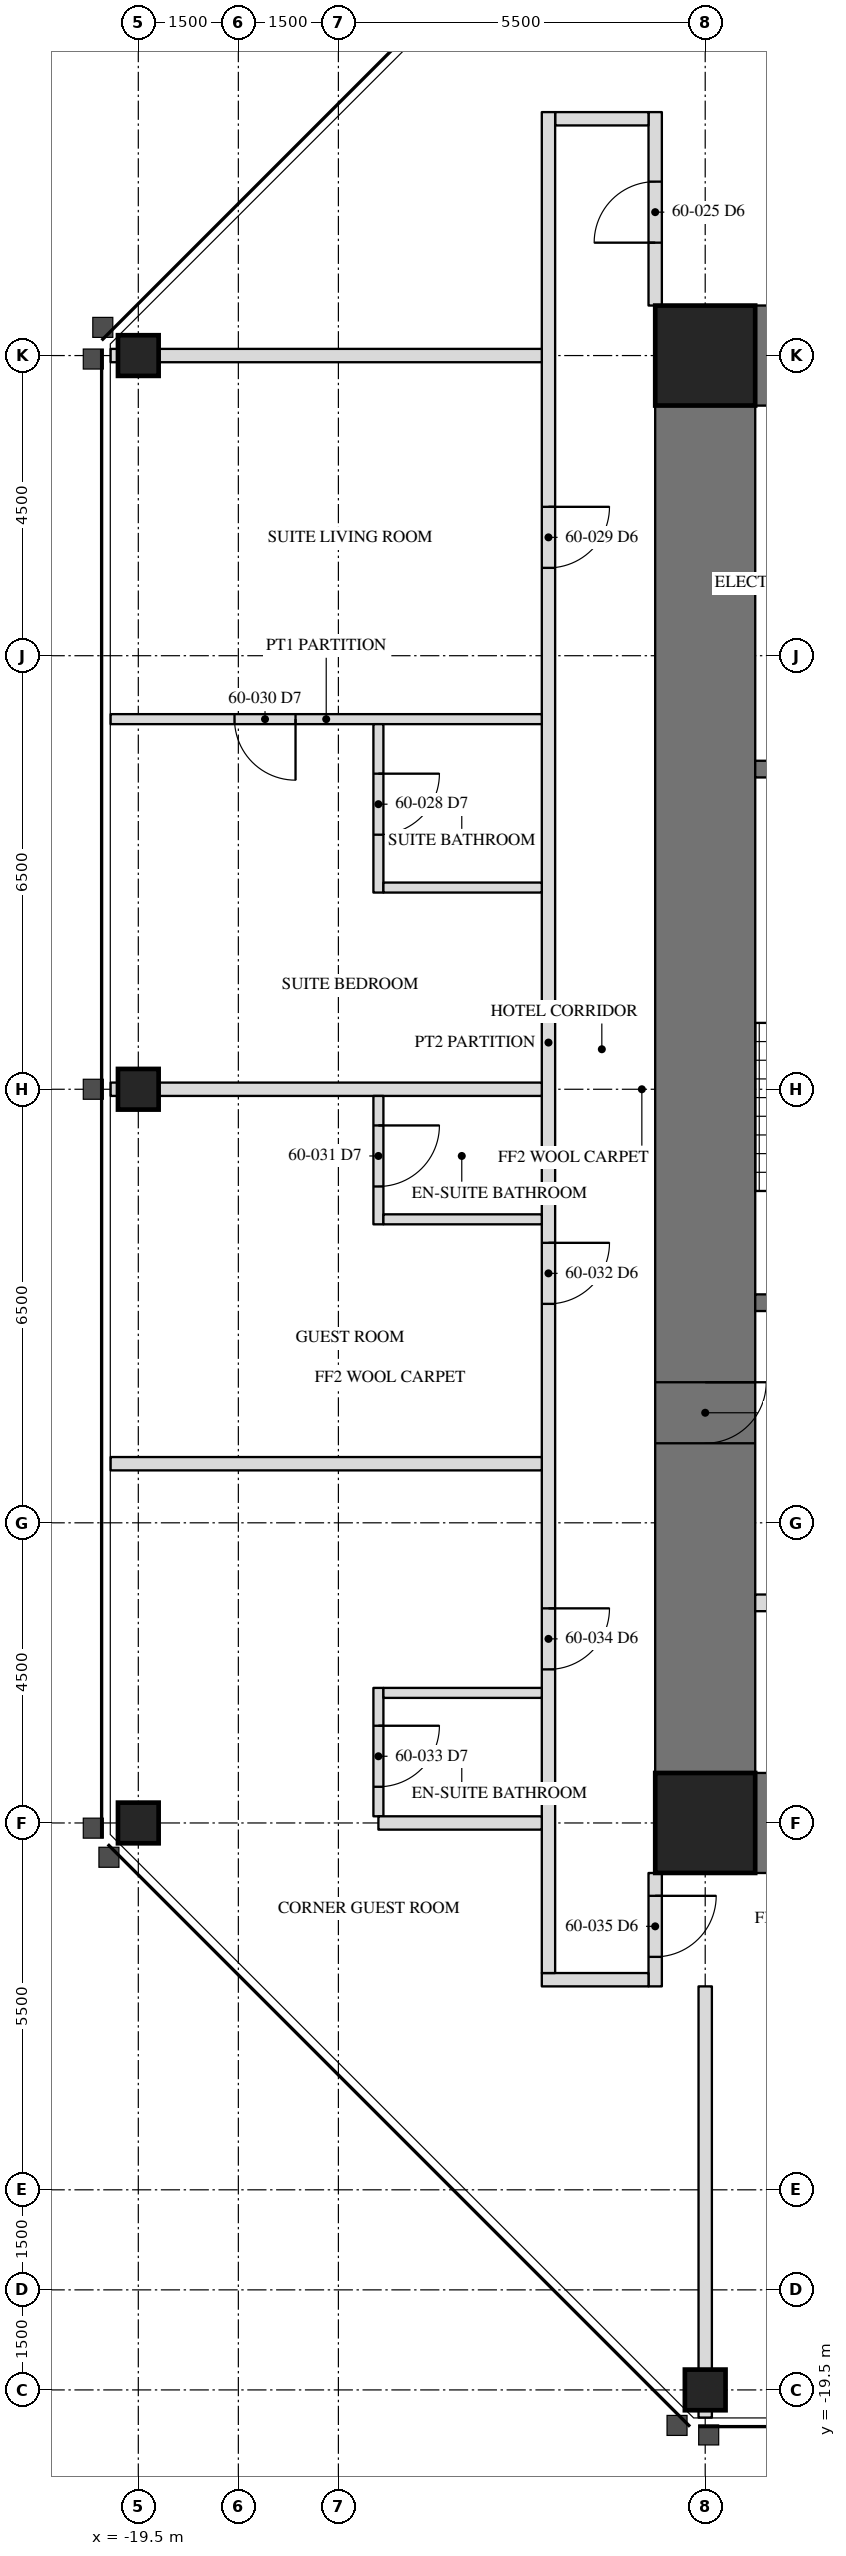
"""IFC4 building model, lengths in metres.
Left out: names, types, materials, properties, quantities, classifications, styles, units other than length and angle.
Written with IfcOpenShell. Run it as: python <this file> out.ifc"""

import sys

from ifc_helpers import new_model, si_unit, direction, frame, frame_2d, origin, origin_2d, place, context, subcontext, project, spatial, rectangle, hollow_rectangle, extrude, element, fill, save


model = new_model("IFC4")
c1 = context("Model", 3, precision=1e-05, world=origin(), true_north=direction((0.0, 1.0)))
c2 = subcontext(c1, "Body", "Model", "MODEL_VIEW")
j1 = project(units=[si_unit("LENGTHUNIT", "METRE"), si_unit("PLANEANGLEUNIT", "RADIAN")], contexts=[c1])
p1 = place(None, origin())
s1 = spatial("IfcSite", under=j1, at=p1, CompositionType="ELEMENT")
p2 = place(p1, origin())
s2 = spatial("IfcBuilding", under=s1, at=p2, CompositionType="ELEMENT")
p3 = place(p2, frame((0.0, 0.0, 246.7)))
s3 = spatial("IfcBuildingStorey", under=s2, at=p3, CompositionType="ELEMENT", Elevation=246.7)
for number, where, z_axis, x_axis in (
    (1, (-19.5, 0.0, 0.0), (0.0, 0.0, 1.0), (0.0, 1.0, 0.0)),
    (2, (-19.5, -11.0, 0.0), (0.0, 0.0, 1.0), (0.0, 1.0, 0.0)),
    (3, (-11.0, -19.5, 0.0), (0.0, 0.0, 1.0), (1.0, 0.0, 0.0)),
    (4, (-19.5, 11.0, 0.0), (0.0, 0.0, 1.0), (0.0, 1.0, 0.0)),
):
    element("IfcColumn", number, at=place(p3, frame(where, z_axis=z_axis, x_axis=x_axis)), inside=s3, PredefinedType="COLUMN", context=c2, shape_type="SweptSolid", body=[
        extrude(hollow_rectangle(XDim=0.61, YDim=0.61, WallThickness=0.051, at=origin_2d()), origin(), (0.0, 0.0, 1.0), 3.5),
    ])
p4 = place(p3, frame((-11.0, 11.0, 0.0), z_axis=(0.0, 0.0, 1.0), x_axis=(0.0, -1.0, 0.0)))
e5 = element("IfcWall", 5, at=p4, inside=s3, PredefinedType="SHEAR", context=c2, shape_type="SweptSolid", body=[
    extrude(rectangle(XDim=22.0, YDim=1.5, at=frame_2d((11.0, 0.0))), origin(), (0.0, 0.0, 1.0), 3.5),
])
p5 = place(p4, frame((15.393, 0.0, 0.0)))
e6 = element("IfcOpeningElement", 6, at=p5, cuts=e5, PredefinedType="OPENING", context=c2, shape_type="SweptSolid", body=[
    extrude(rectangle(XDim=0.915, YDim=2.134, at=frame_2d((0.458, 1.067))), frame((0.0, 0.76, 0.0), z_axis=(0.0, -1.0, 0.0), x_axis=(1.0, 0.0, 0.0)), (0.0, 0.0, 1.0), 1.52),
])
for number, where, z_axis, x_axis in (
    (7, (-6.5, 11.0, 0.0), (0.0, 0.0, 1.0), (-1.0, 0.0, 0.0)),
    (8, (-11.0, -11.0, 0.0), (0.0, 0.0, 1.0), (1.0, 0.0, 0.0)),
):
    element("IfcWall", number, at=place(p3, frame(where, z_axis=z_axis, x_axis=x_axis)), inside=s3, PredefinedType="SHEAR", context=c2, shape_type="SweptSolid", body=[
        extrude(rectangle(XDim=4.5, YDim=1.5, at=frame_2d((2.25, 0.0))), origin(), (0.0, 0.0, 1.0), 3.5),
    ])
for number, where, z_axis, x_axis in (
    (9, (-11.0, 11.0, 0.0), (0.0, 0.0, 1.0), (1.0, 0.0, 0.0)),
    (10, (-11.0, -11.0, 0.0), (0.0, 0.0, 1.0), (1.0, 0.0, 0.0)),
):
    element("IfcColumn", number, at=place(p3, frame(where, z_axis=z_axis, x_axis=x_axis)), inside=s3, PredefinedType="COLUMN", context=c2, shape_type="SweptSolid", body=[
        extrude(hollow_rectangle(XDim=1.499, YDim=1.499, WallThickness=0.102, at=origin_2d()), origin(), (0.0, 0.0, 1.0), 3.5),
    ])
p6 = place(p3, frame((-6.95, 4.8, 0.0), z_axis=(0.0, 0.0, 1.0), x_axis=(-1.0, 0.0, 0.0)))
e11 = element("IfcWall", 11, at=p6, inside=s3, PredefinedType="SOLIDWALL", context=c2, shape_type="SweptSolid", body=[
    extrude(rectangle(XDim=3.3, YDim=0.25, at=frame_2d((1.65, 0.0))), origin(), (0.0, 0.0, 1.0), 3.31),
])
p7 = place(p3, frame((-6.95, -3.2, 0.0), z_axis=(0.0, 0.0, 1.0), x_axis=(-1.0, 0.0, 0.0)))
e12 = element("IfcWall", 12, at=p7, inside=s3, PredefinedType="SOLIDWALL", context=c2, shape_type="SweptSolid", body=[
    extrude(rectangle(XDim=3.3, YDim=0.25, at=frame_2d((1.65, 0.0))), origin(), (0.0, 0.0, 1.0), 3.31),
])
p8 = place(p7, frame((1.116, 0.0, 0.0)))
e13 = element("IfcOpeningElement", 13, at=p8, cuts=e12, PredefinedType="OPENING", context=c2, shape_type="SweptSolid", body=[
    extrude(rectangle(XDim=1.067, YDim=2.134, at=frame_2d((0.533, 1.067))), frame((0.0, 0.135, 0.0), z_axis=(0.0, -1.0, 0.0), x_axis=(1.0, 0.0, 0.0)), (0.0, 0.0, 1.0), 0.27),
])
p9 = place(p3, frame((-6.95, -7.7, 0.0), z_axis=(0.0, 0.0, 1.0), x_axis=(-1.0, 0.0, 0.0)))
e14 = element("IfcWall", 14, at=p9, inside=s3, PredefinedType="PARTITIONING", context=c2, shape_type="SweptSolid", body=[
    extrude(rectangle(XDim=3.3, YDim=0.25, at=frame_2d((1.65, 0.0))), origin(), (0.0, 0.0, 1.0), 3.31),
])
p10 = place(p9, frame((0.45, 0.0, 0.0)))
e15 = element("IfcOpeningElement", 15, at=p10, cuts=e14, PredefinedType="OPENING", context=c2, shape_type="SweptSolid", body=[
    extrude(rectangle(XDim=1.219, YDim=2.134, at=frame_2d((0.609, 1.067))), frame((0.0, 0.135, 0.0), z_axis=(0.0, -1.0, 0.0), x_axis=(1.0, 0.0, 0.0)), (0.0, 0.0, 1.0), 0.27),
])
p11 = place(p3, frame((-11.75, 11.75, 0.0), z_axis=(0.0, 0.0, 1.0), x_axis=(0.0, 1.0, 0.0)))
e16 = element("IfcWall", 16, at=p11, inside=s3, PredefinedType="PARTITIONING", context=c2, shape_type="SweptSolid", body=[
    extrude(rectangle(XDim=2.9, YDim=0.2, at=frame_2d((1.45, 0.0))), origin(), (0.0, 0.0, 1.0), 3.31),
])
p12 = place(p11, frame((0.942, 0.0, 0.0)))
e17 = element("IfcOpeningElement", 17, at=p12, cuts=e16, PredefinedType="OPENING", context=c2, shape_type="SweptSolid", body=[
    extrude(rectangle(XDim=0.915, YDim=2.134, at=frame_2d((0.458, 1.067))), frame((0.0, 0.11, 0.0), z_axis=(0.0, -1.0, 0.0), x_axis=(1.0, 0.0, 0.0)), (0.0, 0.0, 1.0), 0.22),
])
p13 = place(p3, frame((-11.85, 14.55, 0.0), z_axis=(0.0, 0.0, 1.0), x_axis=(-1.0, 0.0, 0.0)))
e18 = element("IfcWall", 18, at=p13, inside=s3, PredefinedType="PARTITIONING", context=c2, shape_type="SweptSolid", body=[
    extrude(rectangle(XDim=1.4, YDim=0.2, at=frame_2d((0.7, 0.0))), origin(), (0.0, 0.0, 1.0), 3.31),
])
p14 = place(p3, frame((-11.75, -11.75, 0.0), z_axis=(0.0, 0.0, 1.0), x_axis=(0.0, -1.0, 0.0)))
e19 = element("IfcWall", 19, at=p14, inside=s3, PredefinedType="PARTITIONING", context=c2, shape_type="SweptSolid", body=[
    extrude(rectangle(XDim=1.7, YDim=0.2, at=frame_2d((0.85, 0.0))), origin(), (0.0, 0.0, 1.0), 3.31),
])
p15 = place(p14, frame((0.343, 0.0, 0.0)))
e20 = element("IfcOpeningElement", 20, at=p15, cuts=e19, PredefinedType="OPENING", context=c2, shape_type="SweptSolid", body=[
    extrude(rectangle(XDim=0.915, YDim=2.134, at=frame_2d((0.458, 1.067))), frame((0.0, 0.11, 0.0), z_axis=(0.0, -1.0, 0.0), x_axis=(1.0, 0.0, 0.0)), (0.0, 0.0, 1.0), 0.22),
])
p16 = place(p3, frame((-13.45, -13.35, 0.0), z_axis=(0.0, 0.0, 1.0), x_axis=(1.0, 0.0, 0.0)))
e21 = element("IfcWall", 21, at=p16, inside=s3, PredefinedType="PARTITIONING", context=c2, shape_type="SweptSolid", body=[
    extrude(rectangle(XDim=1.6, YDim=0.2, at=frame_2d((0.8, 0.0))), origin(), (0.0, 0.0, 1.0), 3.31),
])
p17 = place(p3, frame((-13.35, 14.65, 0.0), z_axis=(0.0, 0.0, 1.0), x_axis=(0.0, -1.0, 0.0)))
e22 = element("IfcWall", 22, at=p17, inside=s3, PredefinedType="PARTITIONING", context=c2, shape_type="SweptSolid", body=[
    extrude(rectangle(XDim=27.9, YDim=0.2, at=frame_2d((13.95, 0.0))), origin(), (0.0, 0.0, 1.0), 3.31),
])
p18 = place(p17, frame((5.918, 0.0, 0.0)))
e23 = element("IfcOpeningElement", 23, at=p18, cuts=e22, PredefinedType="OPENING", context=c2, shape_type="SweptSolid", body=[
    extrude(rectangle(XDim=0.915, YDim=2.134, at=frame_2d((0.458, 1.067))), frame((0.0, 0.11, 0.0), z_axis=(0.0, -1.0, 0.0), x_axis=(1.0, 0.0, 0.0)), (0.0, 0.0, 1.0), 0.22),
])
p19 = place(p17, frame((16.952, 0.0, 0.0)))
e24 = element("IfcOpeningElement", 24, at=p19, cuts=e22, PredefinedType="OPENING", context=c2, shape_type="SweptSolid", body=[
    extrude(rectangle(XDim=0.915, YDim=2.134, at=frame_2d((0.458, 1.067))), frame((0.0, 0.11, 0.0), z_axis=(0.0, -1.0, 0.0), x_axis=(1.0, 0.0, 0.0)), (0.0, 0.0, 1.0), 0.22),
])
p20 = place(p17, frame((22.433, 0.0, 0.0)))
e25 = element("IfcOpeningElement", 25, at=p20, cuts=e22, PredefinedType="OPENING", context=c2, shape_type="SweptSolid", body=[
    extrude(rectangle(XDim=0.915, YDim=2.134, at=frame_2d((0.458, 1.067))), frame((0.0, 0.11, 0.0), z_axis=(0.0, -1.0, 0.0), x_axis=(1.0, 0.0, 0.0)), (0.0, 0.0, 1.0), 0.22),
])
for number, where, z_axis, x_axis in (
    (26, (-13.45, 11.0, 0.0), (0.0, 0.0, 1.0), (-1.0, 0.0, 0.0)),
    (27, (-13.45, 0.0, 0.0), (0.0, 0.0, 1.0), (-1.0, 0.0, 0.0)),
):
    element("IfcWall", number, at=place(p3, frame(where, z_axis=z_axis, x_axis=x_axis)), inside=s3, PredefinedType="PARTITIONING", context=c2, shape_type="SweptSolid", body=[
        extrude(rectangle(XDim=6.465, YDim=0.2, at=frame_2d((3.232, 0.0))), origin(), (0.0, 0.0, 1.0), 2.802),
    ])
p21 = place(p3, frame((-13.45, -5.614, 0.0), z_axis=(0.0, 0.0, 1.0), x_axis=(-1.0, 0.0, 0.0)))
e28 = element("IfcWall", 28, at=p21, inside=s3, PredefinedType="PARTITIONING", context=c2, shape_type="SweptSolid", body=[
    extrude(rectangle(XDim=6.465, YDim=0.2, at=frame_2d((3.232, 0.0))), origin(), (0.0, 0.0, 1.0), 3.31),
])
p22 = place(p3, frame((-13.45, 5.549, 0.0), z_axis=(0.0, 0.0, 1.0), x_axis=(-1.0, 0.0, 0.0)))
e29 = element("IfcWall", 29, at=p22, inside=s3, PredefinedType="PARTITIONING", context=c2, shape_type="SweptSolid", body=[
    extrude(rectangle(XDim=6.465, YDim=0.15, at=frame_2d((3.232, 0.0))), origin(), (0.0, 0.0, 1.0), 3.31),
])
p23 = place(p22, frame((3.692, 0.0, 0.0)))
e30 = element("IfcOpeningElement", 30, at=p23, cuts=e29, PredefinedType="OPENING", context=c2, shape_type="SweptSolid", body=[
    extrude(rectangle(XDim=0.915, YDim=2.032, at=frame_2d((0.458, 1.016))), frame((0.0, 0.085, 0.0), z_axis=(0.0, -1.0, 0.0), x_axis=(1.0, 0.0, 0.0)), (0.0, 0.0, 1.0), 0.17),
])
p24 = place(p3, frame((-15.9, 5.474, 0.0), z_axis=(0.0, 0.0, 1.0), x_axis=(0.0, -1.0, 0.0)))
e31 = element("IfcWall", 31, at=p24, inside=s3, PredefinedType="PARTITIONING", context=c2, shape_type="SweptSolid", body=[
    extrude(rectangle(XDim=2.525, YDim=0.15, at=frame_2d((1.263, 0.0))), origin(), (0.0, 0.0, 1.0), 3.31),
])
p25 = place(p24, frame((0.742, 0.0, 0.0)))
e32 = element("IfcOpeningElement", 32, at=p25, cuts=e31, PredefinedType="OPENING", context=c2, shape_type="SweptSolid", body=[
    extrude(rectangle(XDim=0.915, YDim=2.032, at=frame_2d((0.458, 1.016))), frame((0.0, 0.085, 0.0), z_axis=(0.0, -1.0, 0.0), x_axis=(1.0, 0.0, 0.0)), (0.0, 0.0, 1.0), 0.17),
])
p26 = place(p3, frame((-13.45, 3.024, 0.0), z_axis=(0.0, 0.0, 1.0), x_axis=(-1.0, 0.0, 0.0)))
e33 = element("IfcWall", 33, at=p26, inside=s3, PredefinedType="PARTITIONING", context=c2, shape_type="SweptSolid", body=[
    extrude(rectangle(XDim=2.375, YDim=0.15, at=frame_2d((1.188, 0.0))), origin(), (0.0, 0.0, 1.0), 3.31),
])
p27 = place(p3, frame((-15.9, -0.1, 0.0), z_axis=(0.0, 0.0, 1.0), x_axis=(0.0, -1.0, 0.0)))
e34 = element("IfcWall", 34, at=p27, inside=s3, PredefinedType="PARTITIONING", context=c2, shape_type="SweptSolid", body=[
    extrude(rectangle(XDim=1.925, YDim=0.15, at=frame_2d((0.962, 0.0))), origin(), (0.0, 0.0, 1.0), 3.31),
])
p28 = place(p27, frame((0.442, 0.0, 0.0)))
e35 = element("IfcOpeningElement", 35, at=p28, cuts=e34, PredefinedType="OPENING", context=c2, shape_type="SweptSolid", body=[
    extrude(rectangle(XDim=0.915, YDim=2.032, at=frame_2d((0.458, 1.016))), frame((0.0, 0.085, 0.0), z_axis=(0.0, -1.0, 0.0), x_axis=(1.0, 0.0, 0.0)), (0.0, 0.0, 1.0), 0.17),
])
p29 = place(p3, frame((-13.45, -1.95, 0.0), z_axis=(0.0, 0.0, 1.0), x_axis=(-1.0, 0.0, 0.0)))
e36 = element("IfcWall", 36, at=p29, inside=s3, PredefinedType="PARTITIONING", context=c2, shape_type="SweptSolid", body=[
    extrude(rectangle(XDim=2.375, YDim=0.15, at=frame_2d((1.188, 0.0))), origin(), (0.0, 0.0, 1.0), 3.31),
])
p30 = place(p3, frame((-15.9, -8.975, 0.0), z_axis=(0.0, 0.0, 1.0), x_axis=(0.0, -1.0, 0.0)))
e37 = element("IfcWall", 37, at=p30, inside=s3, PredefinedType="PARTITIONING", context=c2, shape_type="SweptSolid", body=[
    extrude(rectangle(XDim=1.925, YDim=0.15, at=frame_2d((0.962, 0.0))), origin(), (0.0, 0.0, 1.0), 3.31),
])
p31 = place(p30, frame((0.567, 0.0, 0.0)))
e38 = element("IfcOpeningElement", 38, at=p31, cuts=e37, PredefinedType="OPENING", context=c2, shape_type="SweptSolid", body=[
    extrude(rectangle(XDim=0.915, YDim=2.032, at=frame_2d((0.458, 1.016))), frame((0.0, 0.085, 0.0), z_axis=(0.0, -1.0, 0.0), x_axis=(1.0, 0.0, 0.0)), (0.0, 0.0, 1.0), 0.17),
])
p32 = place(p3, frame((-13.45, -9.05, 0.0), z_axis=(0.0, 0.0, 1.0), x_axis=(-1.0, 0.0, 0.0)))
e39 = element("IfcWall", 39, at=p32, inside=s3, PredefinedType="PARTITIONING", context=c2, shape_type="SweptSolid", body=[
    extrude(rectangle(XDim=2.375, YDim=0.15, at=frame_2d((1.188, 0.0))), origin(), (0.0, 0.0, 1.0), 3.31),
])
p33 = place(p3, frame((-13.45, -11.0, 0.0), z_axis=(0.0, 0.0, 1.0), x_axis=(-1.0, 0.0, 0.0)))
e40 = element("IfcWall", 40, at=p33, inside=s3, PredefinedType="PARTITIONING", context=c2, shape_type="SweptSolid", body=[
    extrude(rectangle(XDim=2.45, YDim=0.2, at=frame_2d((1.225, 0.0))), origin(), (0.0, 0.0, 1.0), 2.802),
])
p34 = place(p3, frame((-11.0, -13.45, 0.0), z_axis=(0.0, 0.0, 1.0), x_axis=(0.0, -1.0, 0.0)))
e41 = element("IfcWall", 41, at=p34, inside=s3, PredefinedType="PARTITIONING", context=c2, shape_type="SweptSolid", body=[
    extrude(rectangle(XDim=6.465, YDim=0.2, at=frame_2d((3.232, 0.0))), origin(), (0.0, 0.0, 1.0), 2.802),
])
p35 = place(p5, origin())
e42 = element("IfcDoor", 42, at=p35, inside=s3, OperationType="SINGLE_SWING_RIGHT", PredefinedType="DOOR", context=c2, shape_type="SweptSolid", body=[
    extrude(rectangle(XDim=0.915, YDim=2.134, at=frame_2d((0.458, 1.067))), frame((0.0, -0.675, 0.0), z_axis=(0.0, -1.0, 0.0), x_axis=(1.0, 0.0, 0.0)), (0.0, 0.0, 1.0), 0.05),
])
fill(e6, e42)
p36 = place(p12, origin())
e43 = element("IfcDoor", 43, at=p36, inside=s3, OperationType="SINGLE_SWING_LEFT", PredefinedType="DOOR", context=c2, shape_type="SweptSolid", body=[
    extrude(rectangle(XDim=0.915, YDim=2.134, at=frame_2d((0.458, 1.067))), frame((0.0, 0.025, 0.0), z_axis=(0.0, -1.0, 0.0), x_axis=(1.0, 0.0, 0.0)), (0.0, 0.0, 1.0), 0.05),
])
fill(e17, e43)
p37 = place(p25, origin())
e44 = element("IfcDoor", 44, at=p37, inside=s3, OperationType="SINGLE_SWING_LEFT", PredefinedType="DOOR", context=c2, shape_type="SweptSolid", body=[
    extrude(rectangle(XDim=0.915, YDim=2.032, at=frame_2d((0.458, 1.016))), frame((0.0, 0.025, 0.0), z_axis=(0.0, -1.0, 0.0), x_axis=(1.0, 0.0, 0.0)), (0.0, 0.0, 1.0), 0.05),
])
fill(e32, e44)
p38 = place(p18, origin())
e45 = element("IfcDoor", 45, at=p38, inside=s3, OperationType="SINGLE_SWING_LEFT", PredefinedType="DOOR", context=c2, shape_type="SweptSolid", body=[
    extrude(rectangle(XDim=0.915, YDim=2.134, at=frame_2d((0.458, 1.067))), frame((0.0, 0.025, 0.0), z_axis=(0.0, -1.0, 0.0), x_axis=(1.0, 0.0, 0.0)), (0.0, 0.0, 1.0), 0.05),
])
fill(e23, e45)
p39 = place(p23, origin())
e46 = element("IfcDoor", 46, at=p39, inside=s3, OperationType="SINGLE_SWING_LEFT", PredefinedType="DOOR", context=c2, shape_type="SweptSolid", body=[
    extrude(rectangle(XDim=0.915, YDim=2.032, at=frame_2d((0.458, 1.016))), frame((0.0, 0.025, 0.0), z_axis=(0.0, -1.0, 0.0), x_axis=(1.0, 0.0, 0.0)), (0.0, 0.0, 1.0), 0.05),
])
fill(e30, e46)
p40 = place(p28, origin())
e47 = element("IfcDoor", 47, at=p40, inside=s3, OperationType="SINGLE_SWING_LEFT", PredefinedType="DOOR", context=c2, shape_type="SweptSolid", body=[
    extrude(rectangle(XDim=0.915, YDim=2.032, at=frame_2d((0.458, 1.016))), frame((0.0, 0.025, 0.0), z_axis=(0.0, -1.0, 0.0), x_axis=(1.0, 0.0, 0.0)), (0.0, 0.0, 1.0), 0.05),
])
fill(e35, e47)
p41 = place(p19, origin())
e48 = element("IfcDoor", 48, at=p41, inside=s3, OperationType="SINGLE_SWING_LEFT", PredefinedType="DOOR", context=c2, shape_type="SweptSolid", body=[
    extrude(rectangle(XDim=0.915, YDim=2.134, at=frame_2d((0.458, 1.067))), frame((0.0, 0.025, 0.0), z_axis=(0.0, -1.0, 0.0), x_axis=(1.0, 0.0, 0.0)), (0.0, 0.0, 1.0), 0.05),
])
fill(e24, e48)
p42 = place(p31, origin())
e49 = element("IfcDoor", 49, at=p42, inside=s3, OperationType="SINGLE_SWING_LEFT", PredefinedType="DOOR", context=c2, shape_type="SweptSolid", body=[
    extrude(rectangle(XDim=0.915, YDim=2.032, at=frame_2d((0.458, 1.016))), frame((0.0, 0.025, 0.0), z_axis=(0.0, -1.0, 0.0), x_axis=(1.0, 0.0, 0.0)), (0.0, 0.0, 1.0), 0.05),
])
fill(e38, e49)
p43 = place(p20, origin())
e50 = element("IfcDoor", 50, at=p43, inside=s3, OperationType="SINGLE_SWING_LEFT", PredefinedType="DOOR", context=c2, shape_type="SweptSolid", body=[
    extrude(rectangle(XDim=0.915, YDim=2.134, at=frame_2d((0.458, 1.067))), frame((0.0, 0.025, 0.0), z_axis=(0.0, -1.0, 0.0), x_axis=(1.0, 0.0, 0.0)), (0.0, 0.0, 1.0), 0.05),
])
fill(e25, e50)
p44 = place(p15, origin())
e51 = element("IfcDoor", 51, at=p44, inside=s3, OperationType="SINGLE_SWING_LEFT", PredefinedType="DOOR", context=c2, shape_type="SweptSolid", body=[
    extrude(rectangle(XDim=0.915, YDim=2.134, at=frame_2d((0.458, 1.067))), frame((0.0, 0.025, 0.0), z_axis=(0.0, -1.0, 0.0), x_axis=(1.0, 0.0, 0.0)), (0.0, 0.0, 1.0), 0.05),
])
fill(e20, e51)
save(model, sys.argv[1])
